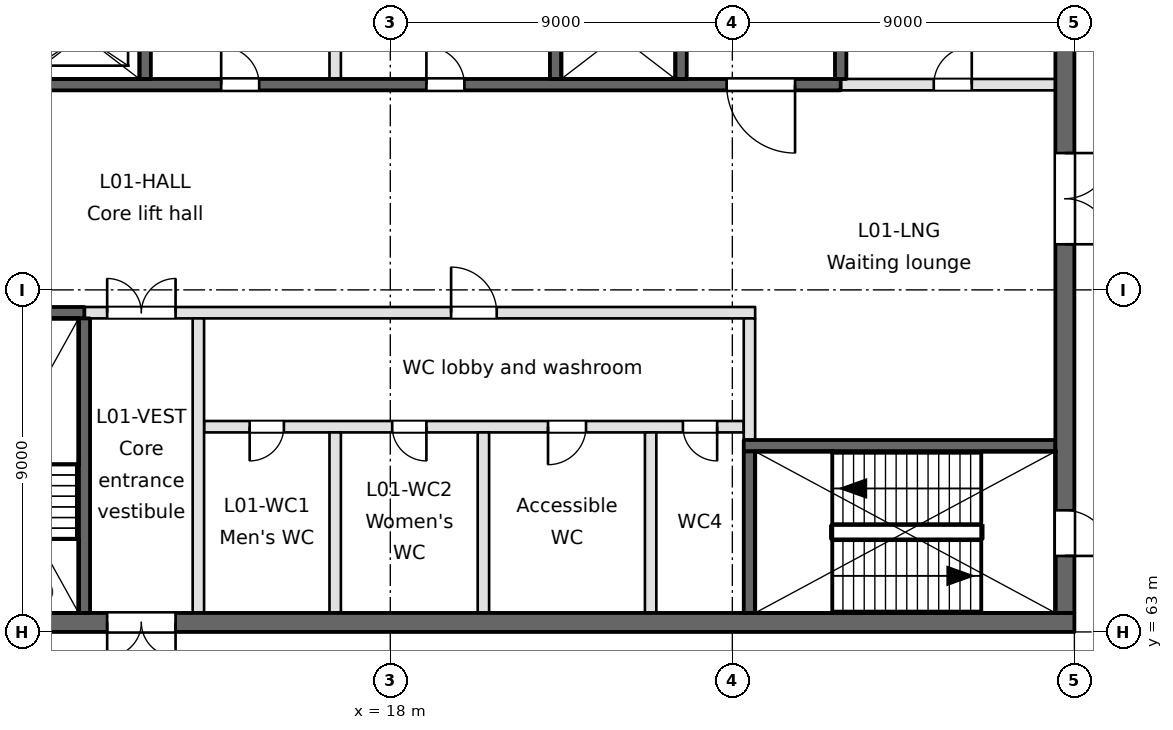
"""IFC4 building model, lengths in metres.
Left out: names, types, materials, properties, quantities, classifications, styles, units other than length and angle.
Written with IfcOpenShell. Run it as: python <this file> out.ifc"""

import sys

from ifc_helpers import new_model, si_unit, direction, frame, frame_2d, origin, place, context, subcontext, project, spatial, rectangle, extrude, element, fill, save


model = new_model("IFC4")
c1 = context("Model", 3, precision=1e-05, world=origin(), true_north=direction((0.0, 1.0)))
c2 = subcontext(c1, "Body", "Model", "MODEL_VIEW")
j1 = project(units=[si_unit("LENGTHUNIT", "METRE"), si_unit("PLANEANGLEUNIT", "RADIAN")], contexts=[c1])
p1 = place(None, origin())
s1 = spatial("IfcSite", under=j1, at=p1, CompositionType="ELEMENT")
p2 = place(p1, origin())
s2 = spatial("IfcBuilding", under=s1, at=p2, CompositionType="ELEMENT")
p3 = place(p2, frame((0.0, 0.0, 6.0)))
s3 = spatial("IfcBuildingStorey", under=s2, at=p3, CompositionType="ELEMENT", Elevation=6.0)
p4 = place(p3, frame((0.9, 63.25, -0.35), z_axis=(0.0, 0.0, 1.0), x_axis=(1.0, 0.0, 0.0)))
e1 = element("IfcWall", 1, at=p4, inside=s3, PredefinedType="SOLIDWALL", context=c2, shape_type="SweptSolid", body=[
    extrude(rectangle(XDim=35.1, YDim=0.5, at=frame_2d((17.55, 0.0))), origin(), (0.0, 0.0, 1.0), 5.4),
])
p5 = place(p4, frame((9.65, 0.0, 0.35)))
e2 = element("IfcOpeningElement", 2, at=p5, cuts=e1, PredefinedType="OPENING", context=c2, shape_type="SweptSolid", body=[
    extrude(rectangle(XDim=1.8, YDim=2.1, at=frame_2d((0.9, 1.05))), frame((0.0, 0.25, 0.0), z_axis=(0.0, -1.0, 0.0), x_axis=(1.0, 0.0, 0.0)), (0.0, 0.0, 1.0), 0.5),
])
p6 = place(p4, frame((1.55, 0.0, 0.35)))
e3 = element("IfcOpeningElement", 3, at=p6, cuts=e1, PredefinedType="OPENING", context=c2, shape_type="SweptSolid", body=[
    extrude(rectangle(XDim=1.2, YDim=2.1, at=frame_2d((0.6, 1.05))), frame((0.0, 0.25, 0.0), z_axis=(0.0, -1.0, 0.0), x_axis=(1.0, 0.0, 0.0)), (0.0, 0.0, 1.0), 0.5),
])
p7 = place(p4, frame((6.15, 0.0, 0.35)))
e4 = element("IfcOpeningElement", 4, at=p7, cuts=e1, PredefinedType="OPENING", context=c2, shape_type="SweptSolid", body=[
    extrude(rectangle(XDim=1.2, YDim=2.1, at=frame_2d((0.6, 1.05))), frame((0.0, 0.25, 0.0), z_axis=(0.0, -1.0, 0.0), x_axis=(1.0, 0.0, 0.0)), (0.0, 0.0, 1.0), 0.5),
])
p8 = place(p3, frame((27.3, 67.9, -0.35), z_axis=(0.0, 0.0, 1.0), x_axis=(1.0, 0.0, 0.0)))
e5 = element("IfcWall", 5, at=p8, inside=s3, PredefinedType="SOLIDWALL", context=c2, shape_type="SweptSolid", body=[
    extrude(rectangle(XDim=8.2, YDim=0.3, at=frame_2d((4.1, 0.0))), origin(), (0.0, 0.0, 1.0), 5.4),
])
p9 = place(p3, frame((13.1, 68.4, 0.0), z_axis=(0.0, 0.0, 1.0), x_axis=(1.0, 0.0, 0.0)))
e6 = element("IfcWall", 6, at=p9, inside=s3, PredefinedType="PARTITIONING", context=c2, shape_type="SweptSolid", body=[
    extrude(rectangle(XDim=14.2, YDim=0.3, at=frame_2d((7.1, 0.0))), origin(), (0.0, 0.0, 1.0), 5.05),
])
p10 = place(p9, frame((1.2, 0.0, 0.0)))
e7 = element("IfcOpeningElement", 7, at=p10, cuts=e6, PredefinedType="OPENING", context=c2, shape_type="SweptSolid", body=[
    extrude(rectangle(XDim=0.9, YDim=2.1, at=frame_2d((0.45, 1.05))), frame((0.0, 0.15, 0.0), z_axis=(0.0, -1.0, 0.0), x_axis=(1.0, 0.0, 0.0)), (0.0, 0.0, 1.0), 0.3),
])
p11 = place(p9, frame((4.95, 0.0, 0.0)))
e8 = element("IfcOpeningElement", 8, at=p11, cuts=e6, PredefinedType="OPENING", context=c2, shape_type="SweptSolid", body=[
    extrude(rectangle(XDim=0.9, YDim=2.1, at=frame_2d((0.45, 1.05))), frame((0.0, 0.15, 0.0), z_axis=(0.0, -1.0, 0.0), x_axis=(1.0, 0.0, 0.0)), (0.0, 0.0, 1.0), 0.3),
])
p12 = place(p9, frame((9.05, 0.0, 0.0)))
e9 = element("IfcOpeningElement", 9, at=p12, cuts=e6, PredefinedType="OPENING", context=c2, shape_type="SweptSolid", body=[
    extrude(rectangle(XDim=1.0, YDim=2.1, at=frame_2d((0.5, 1.05))), frame((0.0, 0.15, 0.0), z_axis=(0.0, -1.0, 0.0), x_axis=(1.0, 0.0, 0.0)), (0.0, 0.0, 1.0), 0.3),
])
p13 = place(p9, frame((12.6, 0.0, 0.0)))
e10 = element("IfcOpeningElement", 10, at=p13, cuts=e6, PredefinedType="OPENING", context=c2, shape_type="SweptSolid", body=[
    extrude(rectangle(XDim=0.9, YDim=2.1, at=frame_2d((0.45, 1.05))), frame((0.0, 0.15, 0.0), z_axis=(0.0, -1.0, 0.0), x_axis=(1.0, 0.0, 0.0)), (0.0, 0.0, 1.0), 0.3),
])
p14 = place(p3, frame((0.9, 71.4, -0.35), z_axis=(0.0, 0.0, 1.0), x_axis=(1.0, 0.0, 0.0)))
e11 = element("IfcWall", 11, at=p14, inside=s3, PredefinedType="SOLIDWALL", context=c2, shape_type="SweptSolid", body=[
    extrude(rectangle(XDim=9.05, YDim=0.3, at=frame_2d((4.525, 0.0))), origin(), (0.0, 0.0, 1.0), 5.4),
])
p15 = place(p3, frame((9.95, 71.4, 0.0), z_axis=(0.0, 0.0, 1.0), x_axis=(1.0, 0.0, 0.0)))
e12 = element("IfcWall", 12, at=p15, inside=s3, PredefinedType="PARTITIONING", context=c2, shape_type="SweptSolid", body=[
    extrude(rectangle(XDim=17.65, YDim=0.3, at=frame_2d((8.825, 0.0))), origin(), (0.0, 0.0, 1.0), 5.05),
])
p16 = place(p15, frame((0.6, 0.0, 0.0)))
e13 = element("IfcOpeningElement", 13, at=p16, cuts=e12, PredefinedType="OPENING", context=c2, shape_type="SweptSolid", body=[
    extrude(rectangle(XDim=1.8, YDim=2.1, at=frame_2d((0.9, 1.05))), frame((0.0, 0.15, 0.0), z_axis=(0.0, -1.0, 0.0), x_axis=(1.0, 0.0, 0.0)), (0.0, 0.0, 1.0), 0.3),
])
p17 = place(p15, frame((9.65, 0.0, 0.0)))
e14 = element("IfcOpeningElement", 14, at=p17, cuts=e12, PredefinedType="OPENING", context=c2, shape_type="SweptSolid", body=[
    extrude(rectangle(XDim=1.2, YDim=2.1, at=frame_2d((0.6, 1.05))), frame((0.0, 0.15, 0.0), z_axis=(0.0, -1.0, 0.0), x_axis=(1.0, 0.0, 0.0)), (0.0, 0.0, 1.0), 0.3),
])
p18 = place(p3, frame((0.9, 77.4, -0.35), z_axis=(0.0, 0.0, 1.0), x_axis=(1.0, 0.0, 0.0)))
e15 = element("IfcWall", 15, at=p18, inside=s3, PredefinedType="SOLIDWALL", context=c2, shape_type="SweptSolid", body=[
    extrude(rectangle(XDim=28.95, YDim=0.3, at=frame_2d((14.475, 0.0))), origin(), (0.0, 0.0, 1.0), 5.4),
])
p19 = place(p18, frame((4.35, 0.0, 0.35)))
e16 = element("IfcOpeningElement", 16, at=p19, cuts=e15, PredefinedType="OPENING", context=c2, shape_type="SweptSolid", body=[
    extrude(rectangle(XDim=1.8, YDim=2.1, at=frame_2d((0.9, 1.05))), frame((0.0, 0.15, 0.0), z_axis=(0.0, -1.0, 0.0), x_axis=(1.0, 0.0, 0.0)), (0.0, 0.0, 1.0), 0.3),
])
p20 = place(p18, frame((25.95, 0.0, 0.35)))
e17 = element("IfcOpeningElement", 17, at=p20, cuts=e15, PredefinedType="OPENING", context=c2, shape_type="SweptSolid", body=[
    extrude(rectangle(XDim=1.8, YDim=2.1, at=frame_2d((0.9, 1.05))), frame((0.0, 0.15, 0.0), z_axis=(0.0, -1.0, 0.0), x_axis=(1.0, 0.0, 0.0)), (0.0, 0.0, 1.0), 0.3),
])
p21 = place(p18, frame((12.65, 0.0, 0.35)))
e18 = element("IfcOpeningElement", 18, at=p21, cuts=e15, PredefinedType="OPENING", context=c2, shape_type="SweptSolid", body=[
    extrude(rectangle(XDim=1.0, YDim=2.1, at=frame_2d((0.5, 1.05))), frame((0.0, 0.15, 0.0), z_axis=(0.0, -1.0, 0.0), x_axis=(1.0, 0.0, 0.0)), (0.0, 0.0, 1.0), 0.3),
])
p22 = place(p18, frame((18.05, 0.0, 0.35)))
e19 = element("IfcOpeningElement", 19, at=p22, cuts=e15, PredefinedType="OPENING", context=c2, shape_type="SweptSolid", body=[
    extrude(rectangle(XDim=1.0, YDim=2.1, at=frame_2d((0.5, 1.05))), frame((0.0, 0.15, 0.0), z_axis=(0.0, -1.0, 0.0), x_axis=(1.0, 0.0, 0.0)), (0.0, 0.0, 1.0), 0.3),
])
p23 = place(p3, frame((29.85, 77.4, 0.0), z_axis=(0.0, 0.0, 1.0), x_axis=(1.0, 0.0, 0.0)))
e20 = element("IfcWall", 20, at=p23, inside=s3, PredefinedType="PARTITIONING", context=c2, shape_type="SweptSolid", body=[
    extrude(rectangle(XDim=5.65, YDim=0.3, at=frame_2d((2.825, 0.0))), origin(), (0.0, 0.0, 1.0), 5.05),
])
p24 = place(p23, frame((2.45, 0.0, 0.0)))
e21 = element("IfcOpeningElement", 21, at=p24, cuts=e20, PredefinedType="OPENING", context=c2, shape_type="SweptSolid", body=[
    extrude(rectangle(XDim=1.0, YDim=2.1, at=frame_2d((0.5, 1.05))), frame((0.0, 0.15, 0.0), z_axis=(0.0, -1.0, 0.0), x_axis=(1.0, 0.0, 0.0)), (0.0, 0.0, 1.0), 0.3),
])
p25 = place(p3, frame((9.95, 63.5, -0.35), z_axis=(0.0, 0.0, 1.0), x_axis=(0.0, 1.0, 0.0)))
e22 = element("IfcWall", 22, at=p25, inside=s3, PredefinedType="SOLIDWALL", context=c2, shape_type="SweptSolid", body=[
    extrude(rectangle(XDim=7.75, YDim=0.3, at=frame_2d((3.875, 0.0))), origin(), (0.0, 0.0, 1.0), 5.4),
])
p26 = place(p3, frame((11.55, 77.55, -0.35), z_axis=(0.0, 0.0, 1.0), x_axis=(0.0, 1.0, 0.0)))
e23 = element("IfcWall", 23, at=p26, inside=s3, PredefinedType="SOLIDWALL", context=c2, shape_type="SweptSolid", body=[
    extrude(rectangle(XDim=10.1, YDim=0.3, at=frame_2d((5.05, 0.0))), origin(), (0.0, 0.0, 1.0), 5.4),
])
p27 = place(p3, frame((12.95, 63.5, 0.0), z_axis=(0.0, 0.0, 1.0), x_axis=(0.0, 1.0, 0.0)))
e24 = element("IfcWall", 24, at=p27, inside=s3, PredefinedType="PARTITIONING", context=c2, shape_type="SweptSolid", body=[
    extrude(rectangle(XDim=7.75, YDim=0.3, at=frame_2d((3.875, 0.0))), origin(), (0.0, 0.0, 1.0), 5.05),
])
p28 = place(p3, frame((16.55, 63.5, 0.0), z_axis=(0.0, 0.0, 1.0), x_axis=(0.0, 1.0, 0.0)))
e25 = element("IfcWall", 25, at=p28, inside=s3, PredefinedType="PARTITIONING", context=c2, shape_type="SweptSolid", body=[
    extrude(rectangle(XDim=4.75, YDim=0.3, at=frame_2d((2.375, 0.0))), origin(), (0.0, 0.0, 1.0), 5.05),
])
p29 = place(p3, frame((16.55, 77.55, 0.0), z_axis=(0.0, 0.0, 1.0), x_axis=(0.0, 1.0, 0.0)))
e26 = element("IfcWall", 26, at=p29, inside=s3, PredefinedType="PARTITIONING", context=c2, shape_type="SweptSolid", body=[
    extrude(rectangle(XDim=12.95, YDim=0.3, at=frame_2d((6.475, 0.0))), origin(), (0.0, 0.0, 1.0), 5.05),
])
p30 = place(p3, frame((20.45, 63.5, 0.0), z_axis=(0.0, 0.0, 1.0), x_axis=(0.0, 1.0, 0.0)))
e27 = element("IfcWall", 27, at=p30, inside=s3, PredefinedType="PARTITIONING", context=c2, shape_type="SweptSolid", body=[
    extrude(rectangle(XDim=4.75, YDim=0.3, at=frame_2d((2.375, 0.0))), origin(), (0.0, 0.0, 1.0), 5.05),
])
p31 = place(p3, frame((22.35, 77.55, -0.35), z_axis=(0.0, 0.0, 1.0), x_axis=(0.0, 1.0, 0.0)))
e28 = element("IfcWall", 28, at=p31, inside=s3, PredefinedType="SOLIDWALL", context=c2, shape_type="SweptSolid", body=[
    extrude(rectangle(XDim=10.1, YDim=0.3, at=frame_2d((5.05, 0.0))), origin(), (0.0, 0.0, 1.0), 5.4),
])
p32 = place(p3, frame((24.85, 63.5, 0.0), z_axis=(0.0, 0.0, 1.0), x_axis=(0.0, 1.0, 0.0)))
e29 = element("IfcWall", 29, at=p32, inside=s3, PredefinedType="PARTITIONING", context=c2, shape_type="SweptSolid", body=[
    extrude(rectangle(XDim=4.75, YDim=0.3, at=frame_2d((2.375, 0.0))), origin(), (0.0, 0.0, 1.0), 5.05),
])
p33 = place(p3, frame((25.65, 77.55, -0.35), z_axis=(0.0, 0.0, 1.0), x_axis=(0.0, 1.0, 0.0)))
e30 = element("IfcWall", 30, at=p33, inside=s3, PredefinedType="SOLIDWALL", context=c2, shape_type="SweptSolid", body=[
    extrude(rectangle(XDim=10.1, YDim=0.3, at=frame_2d((5.05, 0.0))), origin(), (0.0, 0.0, 1.0), 5.4),
])
p34 = place(p3, frame((27.45, 63.5, -0.35), z_axis=(0.0, 0.0, 1.0), x_axis=(0.0, 1.0, 0.0)))
e31 = element("IfcWall", 31, at=p34, inside=s3, PredefinedType="SOLIDWALL", context=c2, shape_type="SweptSolid", body=[
    extrude(rectangle(XDim=4.25, YDim=0.3, at=frame_2d((2.125, 0.0))), origin(), (0.0, 0.0, 1.0), 5.4),
])
p35 = place(p3, frame((27.45, 68.05, 0.0), z_axis=(0.0, 0.0, 1.0), x_axis=(0.0, 1.0, 0.0)))
e32 = element("IfcWall", 32, at=p35, inside=s3, PredefinedType="PARTITIONING", context=c2, shape_type="SweptSolid", body=[
    extrude(rectangle(XDim=3.2, YDim=0.3, at=frame_2d((1.6, 0.0))), origin(), (0.0, 0.0, 1.0), 5.05),
])
p36 = place(p3, frame((29.85, 77.55, -0.35), z_axis=(0.0, 0.0, 1.0), x_axis=(0.0, 1.0, 0.0)))
e33 = element("IfcWall", 33, at=p36, inside=s3, PredefinedType="SOLIDWALL", context=c2, shape_type="SweptSolid", body=[
    extrude(rectangle(XDim=10.1, YDim=0.3, at=frame_2d((5.05, 0.0))), origin(), (0.0, 0.0, 1.0), 5.4),
])
p37 = place(p3, frame((35.75, 63.5, -0.35), z_axis=(0.0, 0.0, 1.0), x_axis=(0.0, 1.0, 0.0)))
e34 = element("IfcWall", 34, at=p37, inside=s3, PredefinedType="SOLIDWALL", context=c2, shape_type="SweptSolid", body=[
    extrude(rectangle(XDim=34.6, YDim=0.5, at=frame_2d((17.3, 0.0))), origin(), (0.0, 0.0, 1.0), 5.4),
])
p38 = place(p37, frame((9.7, 0.0, 0.35)))
e35 = element("IfcOpeningElement", 35, at=p38, cuts=e34, PredefinedType="OPENING", context=c2, shape_type="SweptSolid", body=[
    extrude(rectangle(XDim=2.4, YDim=2.1, at=frame_2d((1.2, 1.05))), frame((0.0, 0.25, 0.0), z_axis=(0.0, -1.0, 0.0), x_axis=(1.0, 0.0, 0.0)), (0.0, 0.0, 1.0), 0.5),
])
p39 = place(p37, frame((27.9, 0.0, 0.35)))
e36 = element("IfcOpeningElement", 36, at=p39, cuts=e34, PredefinedType="OPENING", context=c2, shape_type="SweptSolid", body=[
    extrude(rectangle(XDim=1.5, YDim=2.1, at=frame_2d((0.75, 1.05))), frame((0.0, 0.25, 0.0), z_axis=(0.0, -1.0, 0.0), x_axis=(1.0, 0.0, 0.0)), (0.0, 0.0, 1.0), 0.5),
])
p40 = place(p37, frame((1.5, 0.0, 0.35)))
e37 = element("IfcOpeningElement", 37, at=p40, cuts=e34, PredefinedType="OPENING", context=c2, shape_type="SweptSolid", body=[
    extrude(rectangle(XDim=1.2, YDim=2.1, at=frame_2d((0.6, 1.05))), frame((0.0, 0.25, 0.0), z_axis=(0.0, -1.0, 0.0), x_axis=(1.0, 0.0, 0.0)), (0.0, 0.0, 1.0), 0.5),
])
p41 = place(p20, frame((1.8, 0.0, 0.0), z_axis=(0.0, 0.0, 1.0), x_axis=(-1.0, 0.0, 0.0)))
e38 = element("IfcDoor", 38, at=p41, inside=s3, OperationType="SINGLE_SWING_LEFT", PredefinedType="DOOR", context=c2, shape_type="SweptSolid", body=[
    extrude(rectangle(XDim=1.8, YDim=2.1, at=frame_2d((0.9, 1.05))), frame((0.0, 0.025, 0.0), z_axis=(0.0, -1.0, 0.0), x_axis=(1.0, 0.0, 0.0)), (0.0, 0.0, 1.0), 0.05),
])
fill(e17, e38)
p42 = place(p38, frame((2.4, 0.0, 0.0), z_axis=(0.0, 0.0, 1.0), x_axis=(-1.0, 0.0, 0.0)))
e39 = element("IfcDoor", 39, at=p42, inside=s3, OperationType="DOUBLE_DOOR_SINGLE_SWING", PredefinedType="DOOR", context=c2, shape_type="SweptSolid", body=[
    extrude(rectangle(XDim=2.4, YDim=2.1, at=frame_2d((1.2, 1.05))), frame((0.0, 0.025, 0.0), z_axis=(0.0, -1.0, 0.0), x_axis=(1.0, 0.0, 0.0)), (0.0, 0.0, 1.0), 0.05),
])
fill(e35, e39)
p43 = place(p5, frame((1.8, 0.0, 0.0), z_axis=(0.0, 0.0, 1.0), x_axis=(-1.0, 0.0, 0.0)))
e40 = element("IfcDoor", 40, at=p43, inside=s3, OperationType="DOUBLE_DOOR_SINGLE_SWING", PredefinedType="DOOR", context=c2, shape_type="SweptSolid", body=[
    extrude(rectangle(XDim=1.8, YDim=2.1, at=frame_2d((0.9, 1.05))), frame((0.0, 0.025, 0.0), z_axis=(0.0, -1.0, 0.0), x_axis=(1.0, 0.0, 0.0)), (0.0, 0.0, 1.0), 0.05),
])
fill(e2, e40)
p44 = place(p16, origin())
e41 = element("IfcDoor", 41, at=p44, inside=s3, OperationType="DOUBLE_DOOR_SINGLE_SWING", PredefinedType="DOOR", context=c2, shape_type="SweptSolid", body=[
    extrude(rectangle(XDim=1.8, YDim=2.1, at=frame_2d((0.9, 1.05))), frame((0.0, 0.025, 0.0), z_axis=(0.0, -1.0, 0.0), x_axis=(1.0, 0.0, 0.0)), (0.0, 0.0, 1.0), 0.05),
])
fill(e13, e41)
p45 = place(p10, frame((0.9, 0.0, 0.0), z_axis=(0.0, 0.0, 1.0), x_axis=(-1.0, 0.0, 0.0)))
e42 = element("IfcDoor", 42, at=p45, inside=s3, OperationType="SINGLE_SWING_RIGHT", PredefinedType="DOOR", context=c2, shape_type="SweptSolid", body=[
    extrude(rectangle(XDim=0.9, YDim=2.1, at=frame_2d((0.45, 1.05))), frame((0.0, 0.025, 0.0), z_axis=(0.0, -1.0, 0.0), x_axis=(1.0, 0.0, 0.0)), (0.0, 0.0, 1.0), 0.05),
])
fill(e7, e42)
p46 = place(p11, frame((0.9, 0.0, 0.0), z_axis=(0.0, 0.0, 1.0), x_axis=(-1.0, 0.0, 0.0)))
e43 = element("IfcDoor", 43, at=p46, inside=s3, OperationType="SINGLE_SWING_LEFT", PredefinedType="DOOR", context=c2, shape_type="SweptSolid", body=[
    extrude(rectangle(XDim=0.9, YDim=2.1, at=frame_2d((0.45, 1.05))), frame((0.0, 0.025, 0.0), z_axis=(0.0, -1.0, 0.0), x_axis=(1.0, 0.0, 0.0)), (0.0, 0.0, 1.0), 0.05),
])
fill(e8, e43)
p47 = place(p12, frame((1.0, 0.0, 0.0), z_axis=(0.0, 0.0, 1.0), x_axis=(-1.0, 0.0, 0.0)))
e44 = element("IfcDoor", 44, at=p47, inside=s3, OperationType="SINGLE_SWING_RIGHT", PredefinedType="DOOR", context=c2, shape_type="SweptSolid", body=[
    extrude(rectangle(XDim=1.0, YDim=2.1, at=frame_2d((0.5, 1.05))), frame((0.0, 0.025, 0.0), z_axis=(0.0, -1.0, 0.0), x_axis=(1.0, 0.0, 0.0)), (0.0, 0.0, 1.0), 0.05),
])
fill(e9, e44)
p48 = place(p13, frame((0.9, 0.0, 0.0), z_axis=(0.0, 0.0, 1.0), x_axis=(-1.0, 0.0, 0.0)))
e45 = element("IfcDoor", 45, at=p48, inside=s3, OperationType="SINGLE_SWING_LEFT", PredefinedType="DOOR", context=c2, shape_type="SweptSolid", body=[
    extrude(rectangle(XDim=0.9, YDim=2.1, at=frame_2d((0.45, 1.05))), frame((0.0, 0.025, 0.0), z_axis=(0.0, -1.0, 0.0), x_axis=(1.0, 0.0, 0.0)), (0.0, 0.0, 1.0), 0.05),
])
fill(e10, e45)
p49 = place(p17, origin())
e46 = element("IfcDoor", 46, at=p49, inside=s3, OperationType="SINGLE_SWING_LEFT", PredefinedType="DOOR", context=c2, shape_type="SweptSolid", body=[
    extrude(rectangle(XDim=1.2, YDim=2.1, at=frame_2d((0.6, 1.05))), frame((0.0, 0.025, 0.0), z_axis=(0.0, -1.0, 0.0), x_axis=(1.0, 0.0, 0.0)), (0.0, 0.0, 1.0), 0.05),
])
fill(e14, e46)
p50 = place(p40, frame((1.2, 0.0, 0.0), z_axis=(0.0, 0.0, 1.0), x_axis=(-1.0, 0.0, 0.0)))
e47 = element("IfcDoor", 47, at=p50, inside=s3, OperationType="SINGLE_SWING_RIGHT", PredefinedType="DOOR", context=c2, shape_type="SweptSolid", body=[
    extrude(rectangle(XDim=1.2, YDim=2.1, at=frame_2d((0.6, 1.05))), frame((0.0, 0.025, 0.0), z_axis=(0.0, -1.0, 0.0), x_axis=(1.0, 0.0, 0.0)), (0.0, 0.0, 1.0), 0.05),
])
fill(e37, e47)
p51 = place(p21, origin())
e48 = element("IfcDoor", 48, at=p51, inside=s3, OperationType="SINGLE_SWING_LEFT", PredefinedType="DOOR", context=c2, shape_type="SweptSolid", body=[
    extrude(rectangle(XDim=1.0, YDim=2.1, at=frame_2d((0.5, 1.05))), frame((0.0, 0.025, 0.0), z_axis=(0.0, -1.0, 0.0), x_axis=(1.0, 0.0, 0.0)), (0.0, 0.0, 1.0), 0.05),
])
fill(e18, e48)
p52 = place(p22, origin())
e49 = element("IfcDoor", 49, at=p52, inside=s3, OperationType="SINGLE_SWING_LEFT", PredefinedType="DOOR", context=c2, shape_type="SweptSolid", body=[
    extrude(rectangle(XDim=1.0, YDim=2.1, at=frame_2d((0.5, 1.05))), frame((0.0, 0.025, 0.0), z_axis=(0.0, -1.0, 0.0), x_axis=(1.0, 0.0, 0.0)), (0.0, 0.0, 1.0), 0.05),
])
fill(e19, e49)
p53 = place(p24, origin())
e50 = element("IfcDoor", 50, at=p53, inside=s3, OperationType="SINGLE_SWING_RIGHT", PredefinedType="DOOR", context=c2, shape_type="SweptSolid", body=[
    extrude(rectangle(XDim=1.0, YDim=2.1, at=frame_2d((0.5, 1.05))), frame((0.0, 0.025, 0.0), z_axis=(0.0, -1.0, 0.0), x_axis=(1.0, 0.0, 0.0)), (0.0, 0.0, 1.0), 0.05),
])
fill(e21, e50)
save(model, sys.argv[1])
